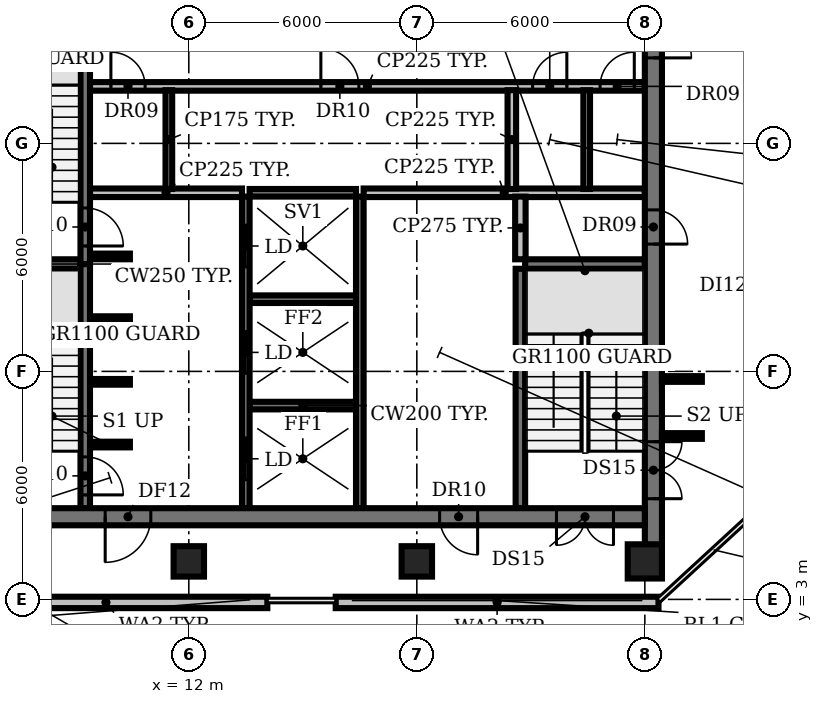
"""IFC4 building model, lengths in metres.
Left out: names, types, materials, properties, quantities, classifications, styles, units other than length and angle.
Written with IfcOpenShell. Run it as: python <this file> out.ifc"""

import sys

from ifc_helpers import new_model, si_unit, direction, frame, frame_2d, origin, origin_2d, place, context, subcontext, project, spatial, rectangle, circle, extrude, element, fill, save


model = new_model("IFC4")
c1 = context("Model", 3, precision=1e-05, world=origin(), true_north=direction((0.0, 1.0)))
c2 = subcontext(c1, "Body", "Model", "MODEL_VIEW")
j1 = project(units=[si_unit("LENGTHUNIT", "METRE"), si_unit("PLANEANGLEUNIT", "RADIAN")], contexts=[c1])
p1 = place(None, origin())
s1 = spatial("IfcSite", under=j1, at=p1, CompositionType="ELEMENT")
p2 = place(p1, origin())
s2 = spatial("IfcBuilding", under=s1, at=p2, CompositionType="ELEMENT")
p3 = place(p2, frame((0.0, 0.0, 209.6)))
s3 = spatial("IfcBuildingStorey", under=s2, at=p3, CompositionType="ELEMENT", Elevation=209.6)
for number, where, z_axis, x_axis in (
    (1, (12.0, 4.0, 0.0), (0.0, 0.0, 1.0), (1.0, 0.0, 0.0)),
    (2, (18.0, 4.0, 0.0), (0.0, 0.0, 1.0), (1.0, 0.0, 0.0)),
):
    element("IfcColumn", number, at=place(p3, frame(where, z_axis=z_axis, x_axis=x_axis)), inside=s3, PredefinedType="COLUMN", context=c2, shape_type="SweptSolid", body=[
        extrude(rectangle(XDim=0.8, YDim=0.8, at=origin_2d()), origin(), (0.0, 0.0, 1.0), 3.8),
    ])
p4 = place(p3, frame((24.0, 4.0, 0.0), z_axis=(0.0, 0.0, 1.0), x_axis=(1.0, 0.0, 0.0)))
e3 = element("IfcColumn", 3, at=p4, inside=s3, PredefinedType="COLUMN", context=c2, shape_type="SweptSolid", body=[
    extrude(circle(Radius=0.45, at=origin_2d()), origin(), (0.0, 0.0, 1.0), 3.8),
])
p5 = place(p3, frame((5.573, 2.92, 0.0), z_axis=(0.0, 0.0, 1.0), x_axis=(1.0, 0.0, 0.0)))
e4 = element("IfcWall", 4, at=p5, inside=s3, PredefinedType="SOLIDWALL", context=c2, shape_type="SweptSolid", body=[
    extrude(rectangle(XDim=8.492, YDim=0.3, at=frame_2d((4.246, 0.0))), origin(), (0.0, 0.0, 1.0), 3.8),
])
p6 = place(p3, frame((15.866, 2.92, 0.0), z_axis=(0.0, 0.0, 1.0), x_axis=(1.0, 0.0, 0.0)))
e5 = element("IfcWall", 5, at=p6, inside=s3, PredefinedType="SOLIDWALL", context=c2, shape_type="SweptSolid", body=[
    extrude(rectangle(XDim=8.493, YDim=0.3, at=frame_2d((4.246, 0.0))), origin(), (0.0, 0.0, 1.0), 3.8),
])
p7 = place(p3, frame((9.4, 7.075, 0.0), z_axis=(0.0, 0.0, 1.0), x_axis=(1.0, 0.0, 0.0)))
e6 = element("IfcWall", 6, at=p7, inside=s3, PredefinedType="SHEAR", context=c2, shape_type="SweptSolid", body=[
    extrude(rectangle(XDim=1.05, YDim=0.15, at=frame_2d((0.525, 0.0))), origin(), (0.0, 0.0, 1.0), 3.8),
])
p8 = place(p3, frame((13.6, 8.1, 0.0), z_axis=(0.0, 0.0, 1.0), x_axis=(1.0, 0.0, 0.0)))
e7 = element("IfcWall", 7, at=p8, inside=s3, PredefinedType="SHEAR", context=c2, shape_type="SweptSolid", body=[
    extrude(rectangle(XDim=2.8, YDim=0.2, at=frame_2d((1.4, 0.0))), origin(), (0.0, 0.0, 1.0), 3.8),
])
for number, where, z_axis, x_axis in (
    (8, (9.4, 8.725, 0.0), (0.0, 0.0, 1.0), (1.0, 0.0, 0.0)),
    (9, (9.4, 10.375, 0.0), (0.0, 0.0, 1.0), (1.0, 0.0, 0.0)),
):
    element("IfcWall", number, at=place(p3, frame(where, z_axis=z_axis, x_axis=x_axis)), inside=s3, PredefinedType="SHEAR", context=c2, shape_type="SweptSolid", body=[
        extrude(rectangle(XDim=1.05, YDim=0.15, at=frame_2d((0.525, 0.0))), origin(), (0.0, 0.0, 1.0), 3.8),
    ])
p9 = place(p3, frame((13.6, 10.9, 0.0), z_axis=(0.0, 0.0, 1.0), x_axis=(1.0, 0.0, 0.0)))
e10 = element("IfcWall", 10, at=p9, inside=s3, PredefinedType="SHEAR", context=c2, shape_type="SweptSolid", body=[
    extrude(rectangle(XDim=2.8, YDim=0.2, at=frame_2d((1.4, 0.0))), origin(), (0.0, 0.0, 1.0), 3.8),
])
for number, where, z_axis, x_axis in (
    (11, (6.0, 11.825, 0.0), (0.0, 0.0, 1.0), (1.0, 0.0, 0.0)),
    (12, (20.85, 11.825, 0.0), (0.0, 0.0, 1.0), (1.0, 0.0, 0.0)),
):
    element("IfcWall", number, at=place(p3, frame(where, z_axis=z_axis, x_axis=x_axis)), inside=s3, PredefinedType="SHEAR", context=c2, shape_type="SweptSolid", body=[
        extrude(rectangle(XDim=3.15, YDim=0.25, at=frame_2d((1.575, 0.0))), origin(), (0.0, 0.0, 1.0), 3.8),
    ])
p10 = place(p3, frame((9.4, 12.025, 0.0), z_axis=(0.0, 0.0, 1.0), x_axis=(1.0, 0.0, 0.0)))
e13 = element("IfcWall", 13, at=p10, inside=s3, PredefinedType="SHEAR", context=c2, shape_type="SweptSolid", body=[
    extrude(rectangle(XDim=1.05, YDim=0.15, at=frame_2d((0.525, 0.0))), origin(), (0.0, 0.0, 1.0), 3.8),
])
p11 = place(p3, frame((9.4, 13.7, 0.0), z_axis=(0.0, 0.0, 1.0), x_axis=(1.0, 0.0, 0.0)))
e14 = element("IfcWall", 14, at=p11, inside=s3, PredefinedType="PARTITIONING", context=c2, shape_type="SweptSolid", body=[
    extrude(rectangle(XDim=4.0, YDim=0.225, at=frame_2d((2.0, 0.0))), origin(), (0.0, 0.0, 1.0), 3.8),
])
p12 = place(p3, frame((13.6, 13.7, 0.0), z_axis=(0.0, 0.0, 1.0), x_axis=(1.0, 0.0, 0.0)))
e15 = element("IfcWall", 15, at=p12, inside=s3, PredefinedType="SHEAR", context=c2, shape_type="SweptSolid", body=[
    extrude(rectangle(XDim=2.8, YDim=0.2, at=frame_2d((1.4, 0.0))), origin(), (0.0, 0.0, 1.0), 3.8),
])
p13 = place(p3, frame((16.6, 13.7, 0.0), z_axis=(0.0, 0.0, 1.0), x_axis=(1.0, 0.0, 0.0)))
e16 = element("IfcWall", 16, at=p13, inside=s3, PredefinedType="PARTITIONING", context=c2, shape_type="SweptSolid", body=[
    extrude(rectangle(XDim=7.4, YDim=0.225, at=frame_2d((3.7, 0.0))), origin(), (0.0, 0.0, 1.0), 3.8),
])
p14 = place(p3, frame((9.4, 16.5, 0.0), z_axis=(0.0, 0.0, 1.0), x_axis=(1.0, 0.0, 0.0)))
e17 = element("IfcWall", 17, at=p14, inside=s3, PredefinedType="PARTITIONING", context=c2, shape_type="SweptSolid", body=[
    extrude(rectangle(XDim=14.6, YDim=0.225, at=frame_2d((7.3, 0.0))), origin(), (0.0, 0.0, 1.0), 3.8),
])
p15 = place(p14, frame((0.55, 0.0, 0.0)))
e18 = element("IfcOpeningElement", 18, at=p15, cuts=e17, PredefinedType="OPENING", context=c2, shape_type="SweptSolid", body=[
    extrude(rectangle(XDim=0.9, YDim=2.1, at=frame_2d((0.45, 1.05))), frame((0.0, 0.123, 0.0), z_axis=(0.0, -1.0, 0.0), x_axis=(1.0, 0.0, 0.0)), (0.0, 0.0, 1.0), 0.245),
])
p16 = place(p14, frame((6.075, 0.0, 0.0)))
e19 = element("IfcOpeningElement", 19, at=p16, cuts=e17, PredefinedType="OPENING", context=c2, shape_type="SweptSolid", body=[
    extrude(rectangle(XDim=1.0, YDim=2.1, at=frame_2d((0.5, 1.05))), frame((0.0, 0.123, 0.0), z_axis=(0.0, -1.0, 0.0), x_axis=(1.0, 0.0, 0.0)), (0.0, 0.0, 1.0), 0.245),
])
p17 = place(p14, frame((11.647, 0.0, 0.0)))
e20 = element("IfcOpeningElement", 20, at=p17, cuts=e17, PredefinedType="OPENING", context=c2, shape_type="SweptSolid", body=[
    extrude(rectangle(XDim=0.9, YDim=2.1, at=frame_2d((0.45, 1.05))), frame((0.0, 0.123, 0.0), z_axis=(0.0, -1.0, 0.0), x_axis=(1.0, 0.0, 0.0)), (0.0, 0.0, 1.0), 0.245),
])
p18 = place(p14, frame((13.423, 0.0, 0.0)))
e21 = element("IfcOpeningElement", 21, at=p18, cuts=e17, PredefinedType="OPENING", context=c2, shape_type="SweptSolid", body=[
    extrude(rectangle(XDim=0.9, YDim=2.1, at=frame_2d((0.45, 1.05))), frame((0.0, 0.123, 0.0), z_axis=(0.0, -1.0, 0.0), x_axis=(1.0, 0.0, 0.0)), (0.0, 0.0, 1.0), 0.245),
])
p19 = place(p3, frame((9.275, 11.825, 0.0), z_axis=(0.0, 0.0, 1.0), x_axis=(0.0, -1.0, 0.0)))
e22 = element("IfcWall", 22, at=p19, inside=s3, PredefinedType="SHEAR", context=c2, shape_type="SweptSolid", body=[
    extrude(rectangle(XDim=6.425, YDim=0.25, at=frame_2d((3.212, 0.0))), origin(), (0.0, 0.0, 1.0), 3.8),
])
p20 = place(p19, frame((5.075, 0.0, 0.0)))
e23 = element("IfcOpeningElement", 23, at=p20, cuts=e22, PredefinedType="OPENING", context=c2, shape_type="SweptSolid", body=[
    extrude(rectangle(XDim=1.0, YDim=2.1, at=frame_2d((0.5, 1.05))), frame((0.0, 0.135, 0.0), z_axis=(0.0, -1.0, 0.0), x_axis=(1.0, 0.0, 0.0)), (0.0, 0.0, 1.0), 0.27),
])
p21 = place(p3, frame((9.275, 18.375, 0.0), z_axis=(0.0, 0.0, 1.0), x_axis=(0.0, -1.0, 0.0)))
e24 = element("IfcWall", 24, at=p21, inside=s3, PredefinedType="SHEAR", context=c2, shape_type="SweptSolid", body=[
    extrude(rectangle(XDim=6.55, YDim=0.25, at=frame_2d((3.275, 0.0))), origin(), (0.0, 0.0, 1.0), 3.8),
])
p22 = place(p21, frame((5.075, 0.0, 0.0)))
e25 = element("IfcOpeningElement", 25, at=p22, cuts=e24, PredefinedType="OPENING", context=c2, shape_type="SweptSolid", body=[
    extrude(rectangle(XDim=1.0, YDim=2.1, at=frame_2d((0.5, 1.05))), frame((0.0, 0.135, 0.0), z_axis=(0.0, -1.0, 0.0), x_axis=(1.0, 0.0, 0.0)), (0.0, 0.0, 1.0), 0.27),
])
p23 = place(p3, frame((11.475, 13.8, 0.0), z_axis=(0.0, 0.0, 1.0), x_axis=(0.0, 1.0, 0.0)))
e26 = element("IfcWall", 26, at=p23, inside=s3, PredefinedType="PARTITIONING", context=c2, shape_type="SweptSolid", body=[
    extrude(rectangle(XDim=2.6, YDim=0.175, at=frame_2d((1.3, 0.0))), origin(), (0.0, 0.0, 1.0), 3.8),
])
p24 = place(p3, frame((13.5, 5.4, 0.0), z_axis=(0.0, 0.0, 1.0), x_axis=(0.0, 1.0, 0.0)))
e27 = element("IfcWall", 27, at=p24, inside=s3, PredefinedType="SHEAR", context=c2, shape_type="SweptSolid", body=[
    extrude(rectangle(XDim=8.2, YDim=0.2, at=frame_2d((4.1, 0.0))), origin(), (0.0, 0.0, 1.0), 3.8),
])
p25 = place(p24, frame((0.75, 0.0, 0.0)))
e28 = element("IfcOpeningElement", 28, at=p25, cuts=e27, PredefinedType="OPENING", context=c2, shape_type="SweptSolid", body=[
    extrude(rectangle(XDim=1.1, YDim=2.1, at=frame_2d((0.55, 1.05))), frame((0.0, 0.11, 0.0), z_axis=(0.0, -1.0, 0.0), x_axis=(1.0, 0.0, 0.0)), (0.0, 0.0, 1.0), 0.22),
])
p26 = place(p24, frame((3.55, 0.0, 0.0)))
e29 = element("IfcOpeningElement", 29, at=p26, cuts=e27, PredefinedType="OPENING", context=c2, shape_type="SweptSolid", body=[
    extrude(rectangle(XDim=1.1, YDim=2.1, at=frame_2d((0.55, 1.05))), frame((0.0, 0.11, 0.0), z_axis=(0.0, -1.0, 0.0), x_axis=(1.0, 0.0, 0.0)), (0.0, 0.0, 1.0), 0.22),
])
p27 = place(p24, frame((6.35, 0.0, 0.0)))
e30 = element("IfcOpeningElement", 30, at=p27, cuts=e27, PredefinedType="OPENING", context=c2, shape_type="SweptSolid", body=[
    extrude(rectangle(XDim=1.1, YDim=2.1, at=frame_2d((0.55, 1.05))), frame((0.0, 0.11, 0.0), z_axis=(0.0, -1.0, 0.0), x_axis=(1.0, 0.0, 0.0)), (0.0, 0.0, 1.0), 0.22),
])
p28 = place(p3, frame((16.5, 5.4, 0.0), z_axis=(0.0, 0.0, 1.0), x_axis=(0.0, 1.0, 0.0)))
e31 = element("IfcWall", 31, at=p28, inside=s3, PredefinedType="SHEAR", context=c2, shape_type="SweptSolid", body=[
    extrude(rectangle(XDim=8.2, YDim=0.2, at=frame_2d((4.1, 0.0))), origin(), (0.0, 0.0, 1.0), 3.8),
])
p29 = place(p3, frame((20.5, 13.8, 0.0), z_axis=(0.0, 0.0, 1.0), x_axis=(0.0, 1.0, 0.0)))
e32 = element("IfcWall", 32, at=p29, inside=s3, PredefinedType="PARTITIONING", context=c2, shape_type="SweptSolid", body=[
    extrude(rectangle(XDim=2.6, YDim=0.225, at=frame_2d((1.3, 0.0))), origin(), (0.0, 0.0, 1.0), 3.8),
])
p30 = place(p3, frame((20.725, 5.4, 0.0), z_axis=(0.0, 0.0, 1.0), x_axis=(0.0, 1.0, 0.0)))
e33 = element("IfcWall", 33, at=p30, inside=s3, PredefinedType="SHEAR", context=c2, shape_type="SweptSolid", body=[
    extrude(rectangle(XDim=6.3, YDim=0.25, at=frame_2d((3.15, 0.0))), origin(), (0.0, 0.0, 1.0), 3.8),
])
p31 = place(p3, frame((20.725, 11.95, 0.0), z_axis=(0.0, 0.0, 1.0), x_axis=(0.0, 1.0, 0.0)))
e34 = element("IfcWall", 34, at=p31, inside=s3, PredefinedType="PARTITIONING", context=c2, shape_type="SweptSolid", body=[
    extrude(rectangle(XDim=1.65, YDim=0.275, at=frame_2d((0.825, 0.0))), origin(), (0.0, 0.0, 1.0), 3.8),
])
p32 = place(p3, frame((22.47, 13.8, 0.0), z_axis=(0.0, 0.0, 1.0), x_axis=(0.0, 1.0, 0.0)))
e35 = element("IfcWall", 35, at=p32, inside=s3, PredefinedType="PARTITIONING", context=c2, shape_type="SweptSolid", body=[
    extrude(rectangle(XDim=2.6, YDim=0.175, at=frame_2d((1.3, 0.0))), origin(), (0.0, 0.0, 1.0), 3.8),
])
p33 = place(p3, frame((24.225, 25.25, 0.0), z_axis=(0.0, 0.0, 1.0), x_axis=(0.0, -1.0, 0.0)))
e36 = element("IfcWall", 36, at=p33, inside=s3, PredefinedType="SHEAR", context=c2, shape_type="SweptSolid", body=[
    extrude(rectangle(XDim=20.83, YDim=0.45, at=frame_2d((10.415, 0.0))), origin(), (0.0, 0.0, 1.0), 3.8),
])
p34 = place(p33, frame((18.1, 0.0, 0.0)))
e37 = element("IfcOpeningElement", 37, at=p34, cuts=e36, PredefinedType="OPENING", context=c2, shape_type="SweptSolid", body=[
    extrude(rectangle(XDim=1.5, YDim=2.1, at=frame_2d((0.75, 1.05))), frame((0.0, 0.235, 0.0), z_axis=(0.0, -1.0, 0.0), x_axis=(1.0, 0.0, 0.0)), (0.0, 0.0, 1.0), 0.47),
])
p35 = place(p33, frame((12.0, 0.0, 0.0)))
e38 = element("IfcOpeningElement", 38, at=p35, cuts=e36, PredefinedType="OPENING", context=c2, shape_type="SweptSolid", body=[
    extrude(rectangle(XDim=0.9, YDim=2.1, at=frame_2d((0.45, 1.05))), frame((0.0, 0.235, 0.0), z_axis=(0.0, -1.0, 0.0), x_axis=(1.0, 0.0, 0.0)), (0.0, 0.0, 1.0), 0.47),
])
p36 = place(p33, frame((6.0, 0.0, 0.0)))
e39 = element("IfcOpeningElement", 39, at=p36, cuts=e36, PredefinedType="OPENING", context=c2, shape_type="SweptSolid", body=[
    extrude(rectangle(XDim=2.0, YDim=2.1, at=frame_2d((1.0, 1.05))), frame((0.0, 0.235, 0.0), z_axis=(0.0, -1.0, 0.0), x_axis=(1.0, 0.0, 0.0)), (0.0, 0.0, 1.0), 0.47),
])
p37 = place(p3, frame((24.0, 5.175, 0.0), z_axis=(0.0, 0.0, 1.0), x_axis=(-1.0, 0.0, 0.0)))
e40 = element("IfcWall", 40, at=p37, inside=s3, PredefinedType="SHEAR", context=c2, shape_type="SweptSolid", body=[
    extrude(rectangle(XDim=18.0, YDim=0.45, at=frame_2d((9.0, 0.0))), origin(), (0.0, 0.0, 1.0), 3.8),
])
p38 = place(p37, frame((0.825, 0.0, 0.0)))
e41 = element("IfcOpeningElement", 41, at=p38, cuts=e40, PredefinedType="OPENING", context=c2, shape_type="SweptSolid", body=[
    extrude(rectangle(XDim=1.5, YDim=2.1, at=frame_2d((0.75, 1.05))), frame((0.0, 0.235, 0.0), z_axis=(0.0, -1.0, 0.0), x_axis=(1.0, 0.0, 0.0)), (0.0, 0.0, 1.0), 0.47),
])
p39 = place(p37, frame((15.675, 0.0, 0.0)))
e42 = element("IfcOpeningElement", 42, at=p39, cuts=e40, PredefinedType="OPENING", context=c2, shape_type="SweptSolid", body=[
    extrude(rectangle(XDim=1.5, YDim=2.1, at=frame_2d((0.75, 1.05))), frame((0.0, 0.235, 0.0), z_axis=(0.0, -1.0, 0.0), x_axis=(1.0, 0.0, 0.0)), (0.0, 0.0, 1.0), 0.47),
])
p40 = place(p37, frame((13.0, 0.0, 0.0)))
e43 = element("IfcOpeningElement", 43, at=p40, cuts=e40, PredefinedType="OPENING", context=c2, shape_type="SweptSolid", body=[
    extrude(rectangle(XDim=1.2, YDim=2.1, at=frame_2d((0.6, 1.05))), frame((0.0, 0.235, 0.0), z_axis=(0.0, -1.0, 0.0), x_axis=(1.0, 0.0, 0.0)), (0.0, 0.0, 1.0), 0.47),
])
p41 = place(p37, frame((4.4, 0.0, 0.0)))
e44 = element("IfcOpeningElement", 44, at=p41, cuts=e40, PredefinedType="OPENING", context=c2, shape_type="SweptSolid", body=[
    extrude(rectangle(XDim=1.0, YDim=2.1, at=frame_2d((0.5, 1.05))), frame((0.0, 0.235, 0.0), z_axis=(0.0, -1.0, 0.0), x_axis=(1.0, 0.0, 0.0)), (0.0, 0.0, 1.0), 0.47),
])
for number, where, z_axis, x_axis in (
    (45, (24.45, 7.3, 0.0), (0.0, 0.0, 1.0), (1.0, 0.0, 0.0)),
    (46, (24.45, 8.8, 0.0), (0.0, 0.0, 1.0), (1.0, 0.0, 0.0)),
):
    element("IfcWall", number, at=place(p3, frame(where, z_axis=z_axis, x_axis=x_axis)), inside=s3, PredefinedType="PARTITIONING", context=c2, shape_type="SweptSolid", body=[
        extrude(rectangle(XDim=1.05, YDim=0.15, at=frame_2d((0.525, 0.0))), origin(), (0.0, 0.0, 1.0), 2.83),
    ])
p42 = place(p15, origin())
e47 = element("IfcDoor", 47, at=p42, inside=s3, OperationType="SINGLE_SWING_LEFT", PredefinedType="DOOR", context=c2, shape_type="SweptSolid", body=[
    extrude(rectangle(XDim=0.9, YDim=2.1, at=frame_2d((0.45, 1.05))), frame((0.0, 0.025, 0.0), z_axis=(0.0, -1.0, 0.0), x_axis=(1.0, 0.0, 0.0)), (0.0, 0.0, 1.0), 0.05),
])
fill(e18, e47)
p43 = place(p16, origin())
e48 = element("IfcDoor", 48, at=p43, inside=s3, OperationType="SINGLE_SWING_LEFT", PredefinedType="DOOR", context=c2, shape_type="SweptSolid", body=[
    extrude(rectangle(XDim=1.0, YDim=2.1, at=frame_2d((0.5, 1.05))), frame((0.0, 0.025, 0.0), z_axis=(0.0, -1.0, 0.0), x_axis=(1.0, 0.0, 0.0)), (0.0, 0.0, 1.0), 0.05),
])
fill(e19, e48)
p44 = place(p17, origin())
e49 = element("IfcDoor", 49, at=p44, inside=s3, OperationType="SINGLE_SWING_RIGHT", PredefinedType="DOOR", context=c2, shape_type="SweptSolid", body=[
    extrude(rectangle(XDim=0.9, YDim=2.1, at=frame_2d((0.45, 1.05))), frame((0.0, 0.025, 0.0), z_axis=(0.0, -1.0, 0.0), x_axis=(1.0, 0.0, 0.0)), (0.0, 0.0, 1.0), 0.05),
])
fill(e20, e49)
p45 = place(p18, origin())
e50 = element("IfcDoor", 50, at=p45, inside=s3, OperationType="SINGLE_SWING_RIGHT", PredefinedType="DOOR", context=c2, shape_type="SweptSolid", body=[
    extrude(rectangle(XDim=0.9, YDim=2.1, at=frame_2d((0.45, 1.05))), frame((0.0, 0.025, 0.0), z_axis=(0.0, -1.0, 0.0), x_axis=(1.0, 0.0, 0.0)), (0.0, 0.0, 1.0), 0.05),
])
fill(e21, e50)
p46 = place(p20, origin())
e51 = element("IfcDoor", 51, at=p46, inside=s3, OperationType="SINGLE_SWING_RIGHT", PredefinedType="DOOR", context=c2, shape_type="SweptSolid", body=[
    extrude(rectangle(XDim=1.0, YDim=2.1, at=frame_2d((0.5, 1.05))), frame((0.0, 0.025, 0.0), z_axis=(0.0, -1.0, 0.0), x_axis=(1.0, 0.0, 0.0)), (0.0, 0.0, 1.0), 0.05),
])
fill(e23, e51)
p47 = place(p22, origin())
e52 = element("IfcDoor", 52, at=p47, inside=s3, OperationType="SINGLE_SWING_RIGHT", PredefinedType="DOOR", context=c2, shape_type="SweptSolid", body=[
    extrude(rectangle(XDim=1.0, YDim=2.1, at=frame_2d((0.5, 1.05))), frame((0.0, 0.025, 0.0), z_axis=(0.0, -1.0, 0.0), x_axis=(1.0, 0.0, 0.0)), (0.0, 0.0, 1.0), 0.05),
])
fill(e25, e52)
p48 = place(p25, origin())
e53 = element("IfcDoor", 53, at=p48, inside=s3, OperationType="DOUBLE_DOOR_SLIDING", PredefinedType="DOOR", context=c2, shape_type="SweptSolid", body=[
    extrude(rectangle(XDim=1.1, YDim=2.1, at=frame_2d((0.55, 1.05))), frame((0.0, 0.025, 0.0), z_axis=(0.0, -1.0, 0.0), x_axis=(1.0, 0.0, 0.0)), (0.0, 0.0, 1.0), 0.05),
])
fill(e28, e53)
p49 = place(p26, origin())
e54 = element("IfcDoor", 54, at=p49, inside=s3, OperationType="DOUBLE_DOOR_SLIDING", PredefinedType="DOOR", context=c2, shape_type="SweptSolid", body=[
    extrude(rectangle(XDim=1.1, YDim=2.1, at=frame_2d((0.55, 1.05))), frame((0.0, 0.025, 0.0), z_axis=(0.0, -1.0, 0.0), x_axis=(1.0, 0.0, 0.0)), (0.0, 0.0, 1.0), 0.05),
])
fill(e29, e54)
p50 = place(p27, origin())
e55 = element("IfcDoor", 55, at=p50, inside=s3, OperationType="DOUBLE_DOOR_SLIDING", PredefinedType="DOOR", context=c2, shape_type="SweptSolid", body=[
    extrude(rectangle(XDim=1.1, YDim=2.1, at=frame_2d((0.55, 1.05))), frame((0.0, 0.025, 0.0), z_axis=(0.0, -1.0, 0.0), x_axis=(1.0, 0.0, 0.0)), (0.0, 0.0, 1.0), 0.05),
])
fill(e30, e55)
p51 = place(p34, origin())
e56 = element("IfcDoor", 56, at=p51, inside=s3, OperationType="DOUBLE_DOOR_SINGLE_SWING", PredefinedType="DOOR", context=c2, shape_type="SweptSolid", body=[
    extrude(rectangle(XDim=1.5, YDim=2.1, at=frame_2d((0.75, 1.05))), frame((0.0, 0.025, 0.0), z_axis=(0.0, -1.0, 0.0), x_axis=(1.0, 0.0, 0.0)), (0.0, 0.0, 1.0), 0.05),
])
fill(e37, e56)
p52 = place(p35, origin())
e57 = element("IfcDoor", 57, at=p52, inside=s3, OperationType="SINGLE_SWING_RIGHT", PredefinedType="DOOR", context=c2, shape_type="SweptSolid", body=[
    extrude(rectangle(XDim=0.9, YDim=2.1, at=frame_2d((0.45, 1.05))), frame((0.0, 0.025, 0.0), z_axis=(0.0, -1.0, 0.0), x_axis=(1.0, 0.0, 0.0)), (0.0, 0.0, 1.0), 0.05),
])
fill(e38, e57)
p53 = place(p36, origin())
e58 = element("IfcDoor", 58, at=p53, inside=s3, OperationType="DOUBLE_DOOR_SINGLE_SWING", PredefinedType="DOOR", context=c2, shape_type="SweptSolid", body=[
    extrude(rectangle(XDim=2.0, YDim=2.1, at=frame_2d((1.0, 1.05))), frame((0.0, 0.025, 0.0), z_axis=(0.0, -1.0, 0.0), x_axis=(1.0, 0.0, 0.0)), (0.0, 0.0, 1.0), 0.05),
])
fill(e39, e58)
p54 = place(p38, origin())
e59 = element("IfcDoor", 59, at=p54, inside=s3, OperationType="DOUBLE_DOOR_SINGLE_SWING", PredefinedType="DOOR", context=c2, shape_type="SweptSolid", body=[
    extrude(rectangle(XDim=1.5, YDim=2.1, at=frame_2d((0.75, 1.05))), frame((0.0, 0.025, 0.0), z_axis=(0.0, -1.0, 0.0), x_axis=(1.0, 0.0, 0.0)), (0.0, 0.0, 1.0), 0.05),
])
fill(e41, e59)
p55 = place(p40, origin())
e60 = element("IfcDoor", 60, at=p55, inside=s3, OperationType="SINGLE_SWING_RIGHT", PredefinedType="DOOR", context=c2, shape_type="SweptSolid", body=[
    extrude(rectangle(XDim=1.2, YDim=2.1, at=frame_2d((0.6, 1.05))), frame((0.0, 0.025, 0.0), z_axis=(0.0, -1.0, 0.0), x_axis=(1.0, 0.0, 0.0)), (0.0, 0.0, 1.0), 0.05),
])
fill(e43, e60)
p56 = place(p41, origin())
e61 = element("IfcDoor", 61, at=p56, inside=s3, OperationType="SINGLE_SWING_LEFT", PredefinedType="DOOR", context=c2, shape_type="SweptSolid", body=[
    extrude(rectangle(XDim=1.0, YDim=2.1, at=frame_2d((0.5, 1.05))), frame((0.0, 0.025, 0.0), z_axis=(0.0, -1.0, 0.0), x_axis=(1.0, 0.0, 0.0)), (0.0, 0.0, 1.0), 0.05),
])
fill(e44, e61)
save(model, sys.argv[1])
